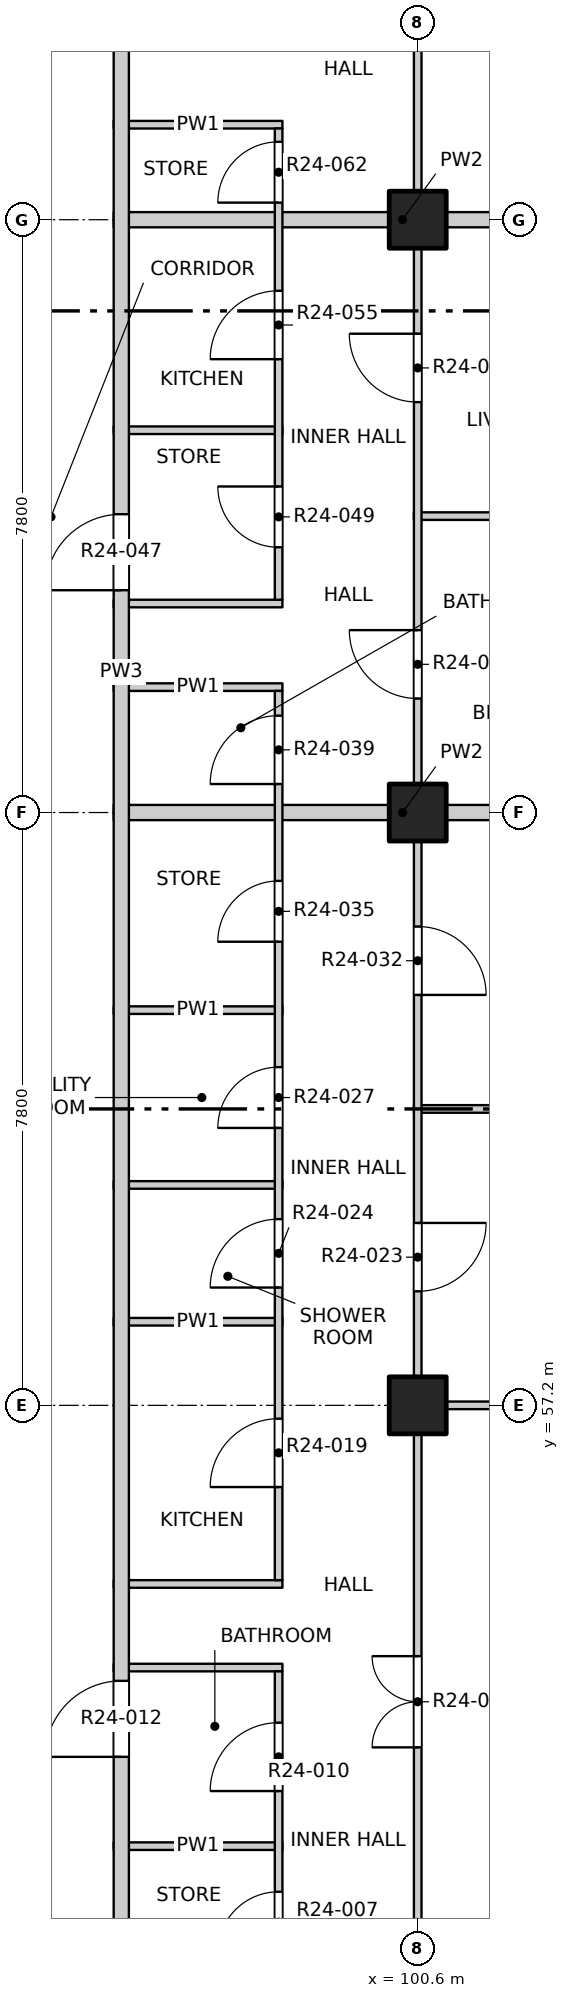
"""IFC4 building model, lengths in metres.
Left out: names, types, materials, properties, quantities, classifications, styles, units other than length and angle.
Written with IfcOpenShell. Run it as: python <this file> out.ifc"""

import sys

from ifc_helpers import new_model, si_unit, direction, frame, frame_2d, origin, origin_2d, place, context, subcontext, project, spatial, rectangle, extrude, element, fill, save


model = new_model("IFC4")
c1 = context("Model", 3, precision=1e-05, world=origin(), true_north=direction((0.0, 1.0)))
c2 = subcontext(c1, "Body", "Model", "MODEL_VIEW")
j1 = project(units=[si_unit("LENGTHUNIT", "METRE"), si_unit("PLANEANGLEUNIT", "RADIAN")], contexts=[c1])
p1 = place(None, origin())
s1 = spatial("IfcSite", under=j1, at=p1, CompositionType="ELEMENT")
p2 = place(p1, origin())
s2 = spatial("IfcBuilding", under=s1, at=p2, CompositionType="ELEMENT")
p3 = place(p2, frame((0.0, 0.0, 249.4)))
s3 = spatial("IfcBuildingStorey", under=s2, at=p3, CompositionType="ELEMENT", Elevation=249.4)
for number, where, z_axis, x_axis in (
    (1, (100.6, 57.2, -0.25), (0.0, 0.0, 1.0), (1.0, 0.0, 0.0)),
    (2, (100.6, 65.0, -0.25), (0.0, 0.0, 1.0), (1.0, 0.0, 0.0)),
    (3, (100.6, 72.8, -0.25), (0.0, 0.0, 1.0), (1.0, 0.0, 0.0)),
):
    element("IfcColumn", number, at=place(p3, frame(where, z_axis=z_axis, x_axis=x_axis)), inside=s3, PredefinedType="COLUMN", context=c2, shape_type="SweptSolid", body=[
        extrude(rectangle(XDim=0.75, YDim=0.75, at=origin_2d()), origin(), (0.0, 0.0, 1.0), 3.4),
    ])
for number, where, z_axis, x_axis in (
    (4, (96.6, 51.4, 0.0), (0.0, 0.0, 1.0), (1.0, 0.0, 0.0)),
    (5, (96.6, 53.75, 0.0), (0.0, 0.0, 1.0), (1.0, 0.0, 0.0)),
    (6, (96.6, 54.85, 0.0), (0.0, 0.0, 1.0), (1.0, 0.0, 0.0)),
):
    element("IfcWall", number, at=place(p3, frame(where, z_axis=z_axis, x_axis=x_axis)), inside=s3, PredefinedType="PARTITIONING", context=c2, shape_type="SweptSolid", body=[
        extrude(rectangle(XDim=2.22, YDim=0.1, at=frame_2d((1.11, 0.0))), origin(), (0.0, 0.0, 1.0), 3.15),
    ])
p4 = place(p3, frame((100.55, 57.2, 0.0), z_axis=(0.0, 0.0, 1.0), x_axis=(1.0, 0.0, 0.0)))
e7 = element("IfcWall", 7, at=p4, inside=s3, PredefinedType="PARTITIONING", context=c2, shape_type="SweptSolid", body=[
    extrude(rectangle(XDim=3.65, YDim=0.1, at=frame_2d((1.825, 0.0))), origin(), (0.0, 0.0, 1.0), 3.15),
])
for number, where, z_axis, x_axis in (
    (8, (96.6, 58.3, 0.0), (0.0, 0.0, 1.0), (1.0, 0.0, 0.0)),
    (9, (96.6, 60.1, 0.0), (0.0, 0.0, 1.0), (1.0, 0.0, 0.0)),
):
    element("IfcWall", number, at=place(p3, frame(where, z_axis=z_axis, x_axis=x_axis)), inside=s3, PredefinedType="PARTITIONING", context=c2, shape_type="SweptSolid", body=[
        extrude(rectangle(XDim=2.22, YDim=0.1, at=frame_2d((1.11, 0.0))), origin(), (0.0, 0.0, 1.0), 3.15),
    ])
p5 = place(p3, frame((100.55, 61.1, 0.0), z_axis=(0.0, 0.0, 1.0), x_axis=(1.0, 0.0, 0.0)))
e10 = element("IfcWall", 10, at=p5, inside=s3, PredefinedType="PARTITIONING", context=c2, shape_type="SweptSolid", body=[
    extrude(rectangle(XDim=3.65, YDim=0.1, at=frame_2d((1.825, 0.0))), origin(), (0.0, 0.0, 1.0), 2.55),
])
p6 = place(p3, frame((96.6, 62.4, 0.0), z_axis=(0.0, 0.0, 1.0), x_axis=(1.0, 0.0, 0.0)))
e11 = element("IfcWall", 11, at=p6, inside=s3, PredefinedType="PARTITIONING", context=c2, shape_type="SweptSolid", body=[
    extrude(rectangle(XDim=2.22, YDim=0.1, at=frame_2d((1.11, 0.0))), origin(), (0.0, 0.0, 1.0), 3.15),
])
p7 = place(p3, frame((96.6, 65.0, 0.0), z_axis=(0.0, 0.0, 1.0), x_axis=(1.0, 0.0, 0.0)))
e12 = element("IfcWall", 12, at=p7, inside=s3, PredefinedType="PARTITIONING", context=c2, shape_type="SweptSolid", body=[
    extrude(rectangle(XDim=7.6, YDim=0.2, at=frame_2d((3.8, 0.0))), origin(), (0.0, 0.0, 1.0), 3.15),
])
for number, where, z_axis, x_axis in (
    (13, (96.6, 66.65, 0.0), (0.0, 0.0, 1.0), (1.0, 0.0, 0.0)),
    (14, (96.6, 67.75, 0.0), (0.0, 0.0, 1.0), (1.0, 0.0, 0.0)),
):
    element("IfcWall", number, at=place(p3, frame(where, z_axis=z_axis, x_axis=x_axis)), inside=s3, PredefinedType="PARTITIONING", context=c2, shape_type="SweptSolid", body=[
        extrude(rectangle(XDim=2.22, YDim=0.1, at=frame_2d((1.11, 0.0))), origin(), (0.0, 0.0, 1.0), 3.15),
    ])
p8 = place(p3, frame((100.55, 68.9, 0.0), z_axis=(0.0, 0.0, 1.0), x_axis=(1.0, 0.0, 0.0)))
e15 = element("IfcWall", 15, at=p8, inside=s3, PredefinedType="PARTITIONING", context=c2, shape_type="SweptSolid", body=[
    extrude(rectangle(XDim=3.65, YDim=0.1, at=frame_2d((1.825, 0.0))), origin(), (0.0, 0.0, 1.0), 2.55),
])
p9 = place(p3, frame((96.6, 70.03, 0.0), z_axis=(0.0, 0.0, 1.0), x_axis=(1.0, 0.0, 0.0)))
e16 = element("IfcWall", 16, at=p9, inside=s3, PredefinedType="PARTITIONING", context=c2, shape_type="SweptSolid", body=[
    extrude(rectangle(XDim=2.22, YDim=0.1, at=frame_2d((1.11, 0.0))), origin(), (0.0, 0.0, 1.0), 3.15),
])
p10 = place(p3, frame((96.6, 72.8, 0.0), z_axis=(0.0, 0.0, 1.0), x_axis=(1.0, 0.0, 0.0)))
e17 = element("IfcWall", 17, at=p10, inside=s3, PredefinedType="PARTITIONING", context=c2, shape_type="SweptSolid", body=[
    extrude(rectangle(XDim=7.6, YDim=0.2, at=frame_2d((3.8, 0.0))), origin(), (0.0, 0.0, 1.0), 3.15),
])
p11 = place(p3, frame((96.6, 74.05, 0.0), z_axis=(0.0, 0.0, 1.0), x_axis=(1.0, 0.0, 0.0)))
e18 = element("IfcWall", 18, at=p11, inside=s3, PredefinedType="PARTITIONING", context=c2, shape_type="SweptSolid", body=[
    extrude(rectangle(XDim=2.22, YDim=0.1, at=frame_2d((1.11, 0.0))), origin(), (0.0, 0.0, 1.0), 3.15),
])
p12 = place(p3, frame((96.7, 49.5, 0.0), z_axis=(0.0, 0.0, 1.0), x_axis=(0.0, 1.0, 0.0)))
e19 = element("IfcWall", 19, at=p12, inside=s3, PredefinedType="PARTITIONING", context=c2, shape_type="SweptSolid", body=[
    extrude(rectangle(XDim=34.7, YDim=0.2, at=frame_2d((17.35, 0.0))), origin(), (0.0, 0.0, 1.0), 3.15),
])
p13 = place(p12, frame((3.075, 0.0, 0.0)))
e20 = element("IfcOpeningElement", 20, at=p13, cuts=e19, PredefinedType="OPENING", context=c2, shape_type="SweptSolid", body=[
    extrude(rectangle(XDim=1.0, YDim=2.1, at=frame_2d((0.5, 1.05))), frame((0.0, 0.11, 0.0), z_axis=(0.0, -1.0, 0.0), x_axis=(1.0, 0.0, 0.0)), (0.0, 0.0, 1.0), 0.22),
])
p14 = place(p12, frame((18.425, 0.0, 0.0)))
e21 = element("IfcOpeningElement", 21, at=p14, cuts=e19, PredefinedType="OPENING", context=c2, shape_type="SweptSolid", body=[
    extrude(rectangle(XDim=1.0, YDim=2.1, at=frame_2d((0.5, 1.05))), frame((0.0, 0.11, 0.0), z_axis=(0.0, -1.0, 0.0), x_axis=(1.0, 0.0, 0.0)), (0.0, 0.0, 1.0), 0.22),
])
p15 = place(p12, frame((25.825, 0.0, 0.0)))
e22 = element("IfcOpeningElement", 22, at=p15, cuts=e19, PredefinedType="OPENING", context=c2, shape_type="SweptSolid", body=[
    extrude(rectangle(XDim=1.0, YDim=2.1, at=frame_2d((0.5, 1.05))), frame((0.0, 0.11, 0.0), z_axis=(0.0, -1.0, 0.0), x_axis=(1.0, 0.0, 0.0)), (0.0, 0.0, 1.0), 0.22),
])
p16 = place(p3, frame((98.77, 49.45, 0.0), z_axis=(0.0, 0.0, 1.0), x_axis=(0.0, 1.0, 0.0)))
e23 = element("IfcWall", 23, at=p16, inside=s3, PredefinedType="PARTITIONING", context=c2, shape_type="SweptSolid", body=[
    extrude(rectangle(XDim=4.25, YDim=0.1, at=frame_2d((2.125, 0.0))), origin(), (0.0, 0.0, 1.0), 3.15),
])
p17 = place(p16, frame((0.55, 0.0, 0.0)))
e24 = element("IfcOpeningElement", 24, at=p17, cuts=e23, PredefinedType="OPENING", context=c2, shape_type="SweptSolid", body=[
    extrude(rectangle(XDim=0.8, YDim=2.1, at=frame_2d((0.4, 1.05))), frame((0.0, 0.06, 0.0), z_axis=(0.0, -1.0, 0.0), x_axis=(1.0, 0.0, 0.0)), (0.0, 0.0, 1.0), 0.12),
])
p18 = place(p16, frame((2.675, 0.0, 0.0)))
e25 = element("IfcOpeningElement", 25, at=p18, cuts=e23, PredefinedType="OPENING", context=c2, shape_type="SweptSolid", body=[
    extrude(rectangle(XDim=0.9, YDim=2.1, at=frame_2d((0.45, 1.05))), frame((0.0, 0.06, 0.0), z_axis=(0.0, -1.0, 0.0), x_axis=(1.0, 0.0, 0.0)), (0.0, 0.0, 1.0), 0.12),
])
p19 = place(p3, frame((98.77, 54.9, 0.0), z_axis=(0.0, 0.0, 1.0), x_axis=(0.0, 1.0, 0.0)))
e26 = element("IfcWall", 26, at=p19, inside=s3, PredefinedType="PARTITIONING", context=c2, shape_type="SweptSolid", body=[
    extrude(rectangle(XDim=11.7, YDim=0.1, at=frame_2d((5.85, 0.0))), origin(), (0.0, 0.0, 1.0), 3.15),
])
p20 = place(p19, frame((1.225, 0.0, 0.0)))
e27 = element("IfcOpeningElement", 27, at=p20, cuts=e26, PredefinedType="OPENING", context=c2, shape_type="SweptSolid", body=[
    extrude(rectangle(XDim=0.9, YDim=2.1, at=frame_2d((0.45, 1.05))), frame((0.0, 0.06, 0.0), z_axis=(0.0, -1.0, 0.0), x_axis=(1.0, 0.0, 0.0)), (0.0, 0.0, 1.0), 0.12),
])
p21 = place(p19, frame((3.85, 0.0, 0.0)))
e28 = element("IfcOpeningElement", 28, at=p21, cuts=e26, PredefinedType="OPENING", context=c2, shape_type="SweptSolid", body=[
    extrude(rectangle(XDim=0.9, YDim=2.1, at=frame_2d((0.45, 1.05))), frame((0.0, 0.06, 0.0), z_axis=(0.0, -1.0, 0.0), x_axis=(1.0, 0.0, 0.0)), (0.0, 0.0, 1.0), 0.12),
])
p22 = place(p19, frame((5.95, 0.0, 0.0)))
e29 = element("IfcOpeningElement", 29, at=p22, cuts=e26, PredefinedType="OPENING", context=c2, shape_type="SweptSolid", body=[
    extrude(rectangle(XDim=0.8, YDim=2.1, at=frame_2d((0.4, 1.05))), frame((0.0, 0.06, 0.0), z_axis=(0.0, -1.0, 0.0), x_axis=(1.0, 0.0, 0.0)), (0.0, 0.0, 1.0), 0.12),
])
p23 = place(p19, frame((8.4, 0.0, 0.0)))
e30 = element("IfcOpeningElement", 30, at=p23, cuts=e26, PredefinedType="OPENING", context=c2, shape_type="SweptSolid", body=[
    extrude(rectangle(XDim=0.8, YDim=2.1, at=frame_2d((0.4, 1.05))), frame((0.0, 0.06, 0.0), z_axis=(0.0, -1.0, 0.0), x_axis=(1.0, 0.0, 0.0)), (0.0, 0.0, 1.0), 0.12),
])
p24 = place(p19, frame((10.475, 0.0, 0.0)))
e31 = element("IfcOpeningElement", 31, at=p24, cuts=e26, PredefinedType="OPENING", context=c2, shape_type="SweptSolid", body=[
    extrude(rectangle(XDim=0.9, YDim=2.1, at=frame_2d((0.45, 1.05))), frame((0.0, 0.06, 0.0), z_axis=(0.0, -1.0, 0.0), x_axis=(1.0, 0.0, 0.0)), (0.0, 0.0, 1.0), 0.12),
])
p25 = place(p3, frame((98.77, 67.8, 0.0), z_axis=(0.0, 0.0, 1.0), x_axis=(0.0, 1.0, 0.0)))
e32 = element("IfcWall", 32, at=p25, inside=s3, PredefinedType="PARTITIONING", context=c2, shape_type="SweptSolid", body=[
    extrude(rectangle(XDim=6.2, YDim=0.1, at=frame_2d((3.1, 0.0))), origin(), (0.0, 0.0, 1.0), 3.15),
])
p26 = place(p25, frame((0.69, 0.0, 0.0)))
e33 = element("IfcOpeningElement", 33, at=p26, cuts=e32, PredefinedType="OPENING", context=c2, shape_type="SweptSolid", body=[
    extrude(rectangle(XDim=0.8, YDim=2.1, at=frame_2d((0.4, 1.05))), frame((0.0, 0.06, 0.0), z_axis=(0.0, -1.0, 0.0), x_axis=(1.0, 0.0, 0.0)), (0.0, 0.0, 1.0), 0.12),
])
p27 = place(p25, frame((3.165, 0.0, 0.0)))
e34 = element("IfcOpeningElement", 34, at=p27, cuts=e32, PredefinedType="OPENING", context=c2, shape_type="SweptSolid", body=[
    extrude(rectangle(XDim=0.9, YDim=2.1, at=frame_2d((0.45, 1.05))), frame((0.0, 0.06, 0.0), z_axis=(0.0, -1.0, 0.0), x_axis=(1.0, 0.0, 0.0)), (0.0, 0.0, 1.0), 0.12),
])
p28 = place(p25, frame((5.225, 0.0, 0.0)))
e35 = element("IfcOpeningElement", 35, at=p28, cuts=e32, PredefinedType="OPENING", context=c2, shape_type="SweptSolid", body=[
    extrude(rectangle(XDim=0.8, YDim=2.1, at=frame_2d((0.4, 1.05))), frame((0.0, 0.06, 0.0), z_axis=(0.0, -1.0, 0.0), x_axis=(1.0, 0.0, 0.0)), (0.0, 0.0, 1.0), 0.12),
])
p29 = place(p3, frame((100.6, 45.8, 0.0), z_axis=(0.0, 0.0, 1.0), x_axis=(0.0, 1.0, 0.0)))
e36 = element("IfcWall", 36, at=p29, inside=s3, PredefinedType="PARTITIONING", context=c2, shape_type="SweptSolid", body=[
    extrude(rectangle(XDim=38.4, YDim=0.1, at=frame_2d((19.2, 0.0))), origin(), (0.0, 0.0, 1.0), 3.15),
])
p30 = place(p29, frame((1.05, 0.0, 0.0)))
e37 = element("IfcOpeningElement", 37, at=p30, cuts=e36, PredefinedType="OPENING", context=c2, shape_type="SweptSolid", body=[
    extrude(rectangle(XDim=1.2, YDim=2.1, at=frame_2d((0.6, 1.05))), frame((0.0, 0.06, 0.0), z_axis=(0.0, -1.0, 0.0), x_axis=(1.0, 0.0, 0.0)), (0.0, 0.0, 1.0), 0.12),
])
p31 = place(p29, frame((6.9, 0.0, 0.0)))
e38 = element("IfcOpeningElement", 38, at=p31, cuts=e36, PredefinedType="OPENING", context=c2, shape_type="SweptSolid", body=[
    extrude(rectangle(XDim=1.2, YDim=2.1, at=frame_2d((0.6, 1.05))), frame((0.0, 0.06, 0.0), z_axis=(0.0, -1.0, 0.0), x_axis=(1.0, 0.0, 0.0)), (0.0, 0.0, 1.0), 0.12),
])
p32 = place(p29, frame((12.9, 0.0, 0.0)))
e39 = element("IfcOpeningElement", 39, at=p32, cuts=e36, PredefinedType="OPENING", context=c2, shape_type="SweptSolid", body=[
    extrude(rectangle(XDim=0.9, YDim=2.1, at=frame_2d((0.45, 1.05))), frame((0.0, 0.06, 0.0), z_axis=(0.0, -1.0, 0.0), x_axis=(1.0, 0.0, 0.0)), (0.0, 0.0, 1.0), 0.12),
])
p33 = place(p29, frame((16.8, 0.0, 0.0)))
e40 = element("IfcOpeningElement", 40, at=p33, cuts=e36, PredefinedType="OPENING", context=c2, shape_type="SweptSolid", body=[
    extrude(rectangle(XDim=0.9, YDim=2.1, at=frame_2d((0.45, 1.05))), frame((0.0, 0.06, 0.0), z_axis=(0.0, -1.0, 0.0), x_axis=(1.0, 0.0, 0.0)), (0.0, 0.0, 1.0), 0.12),
])
p34 = place(p29, frame((20.7, 0.0, 0.0)))
e41 = element("IfcOpeningElement", 41, at=p34, cuts=e36, PredefinedType="OPENING", context=c2, shape_type="SweptSolid", body=[
    extrude(rectangle(XDim=0.9, YDim=2.1, at=frame_2d((0.45, 1.05))), frame((0.0, 0.06, 0.0), z_axis=(0.0, -1.0, 0.0), x_axis=(1.0, 0.0, 0.0)), (0.0, 0.0, 1.0), 0.12),
])
p35 = place(p29, frame((24.6, 0.0, 0.0)))
e42 = element("IfcOpeningElement", 42, at=p35, cuts=e36, PredefinedType="OPENING", context=c2, shape_type="SweptSolid", body=[
    extrude(rectangle(XDim=0.9, YDim=2.1, at=frame_2d((0.45, 1.05))), frame((0.0, 0.06, 0.0), z_axis=(0.0, -1.0, 0.0), x_axis=(1.0, 0.0, 0.0)), (0.0, 0.0, 1.0), 0.12),
])
p36 = place(p29, frame((30.3, 0.0, 0.0)))
e43 = element("IfcOpeningElement", 43, at=p36, cuts=e36, PredefinedType="OPENING", context=c2, shape_type="SweptSolid", body=[
    extrude(rectangle(XDim=1.2, YDim=2.1, at=frame_2d((0.6, 1.05))), frame((0.0, 0.06, 0.0), z_axis=(0.0, -1.0, 0.0), x_axis=(1.0, 0.0, 0.0)), (0.0, 0.0, 1.0), 0.12),
])
p37 = place(p29, frame((36.15, 0.0, 0.0)))
e44 = element("IfcOpeningElement", 44, at=p37, cuts=e36, PredefinedType="OPENING", context=c2, shape_type="SweptSolid", body=[
    extrude(rectangle(XDim=1.2, YDim=2.1, at=frame_2d((0.6, 1.05))), frame((0.0, 0.06, 0.0), z_axis=(0.0, -1.0, 0.0), x_axis=(1.0, 0.0, 0.0)), (0.0, 0.0, 1.0), 0.12),
])
p38 = place(p17, origin())
e45 = element("IfcDoor", 45, at=p38, inside=s3, OperationType="SINGLE_SWING_LEFT", PredefinedType="DOOR", context=c2, shape_type="SweptSolid", body=[
    extrude(rectangle(XDim=0.8, YDim=2.1, at=frame_2d((0.4, 1.05))), frame((0.0, 0.025, 0.0), z_axis=(0.0, -1.0, 0.0), x_axis=(1.0, 0.0, 0.0)), (0.0, 0.0, 1.0), 0.05),
])
fill(e24, e45)
p39 = place(p18, origin())
e46 = element("IfcDoor", 46, at=p39, inside=s3, OperationType="SINGLE_SWING_LEFT", PredefinedType="DOOR", context=c2, shape_type="SweptSolid", body=[
    extrude(rectangle(XDim=0.9, YDim=2.1, at=frame_2d((0.45, 1.05))), frame((0.0, 0.025, 0.0), z_axis=(0.0, -1.0, 0.0), x_axis=(1.0, 0.0, 0.0)), (0.0, 0.0, 1.0), 0.05),
])
fill(e25, e46)
p40 = place(p13, origin())
e47 = element("IfcDoor", 47, at=p40, inside=s3, OperationType="SINGLE_SWING_RIGHT", PredefinedType="DOOR", context=c2, shape_type="SweptSolid", body=[
    extrude(rectangle(XDim=1.0, YDim=2.1, at=frame_2d((0.5, 1.05))), frame((0.0, 0.025, 0.0), z_axis=(0.0, -1.0, 0.0), x_axis=(1.0, 0.0, 0.0)), (0.0, 0.0, 1.0), 0.05),
])
fill(e20, e47)
p41 = place(p31, origin())
e48 = element("IfcDoor", 48, at=p41, inside=s3, OperationType="DOUBLE_DOOR_SINGLE_SWING", PredefinedType="DOOR", context=c2, shape_type="SweptSolid", body=[
    extrude(rectangle(XDim=1.2, YDim=2.1, at=frame_2d((0.6, 1.05))), frame((0.0, 0.025, 0.0), z_axis=(0.0, -1.0, 0.0), x_axis=(1.0, 0.0, 0.0)), (0.0, 0.0, 1.0), 0.05),
])
fill(e38, e48)
p42 = place(p20, origin())
e49 = element("IfcDoor", 49, at=p42, inside=s3, OperationType="SINGLE_SWING_LEFT", PredefinedType="DOOR", context=c2, shape_type="SweptSolid", body=[
    extrude(rectangle(XDim=0.9, YDim=2.1, at=frame_2d((0.45, 1.05))), frame((0.0, 0.025, 0.0), z_axis=(0.0, -1.0, 0.0), x_axis=(1.0, 0.0, 0.0)), (0.0, 0.0, 1.0), 0.05),
])
fill(e27, e49)
p43 = place(p32, origin())
e50 = element("IfcDoor", 50, at=p43, inside=s3, OperationType="SINGLE_SWING_LEFT", PredefinedType="DOOR", context=c2, shape_type="SweptSolid", body=[
    extrude(rectangle(XDim=0.9, YDim=2.1, at=frame_2d((0.45, 1.05))), frame((0.0, 0.025, 0.0), z_axis=(0.0, -1.0, 0.0), x_axis=(1.0, 0.0, 0.0)), (0.0, 0.0, 1.0), 0.05),
])
fill(e39, e50)
p44 = place(p21, origin())
e51 = element("IfcDoor", 51, at=p44, inside=s3, OperationType="SINGLE_SWING_LEFT", PredefinedType="DOOR", context=c2, shape_type="SweptSolid", body=[
    extrude(rectangle(XDim=0.9, YDim=2.1, at=frame_2d((0.45, 1.05))), frame((0.0, 0.025, 0.0), z_axis=(0.0, -1.0, 0.0), x_axis=(1.0, 0.0, 0.0)), (0.0, 0.0, 1.0), 0.05),
])
fill(e28, e51)
p45 = place(p22, origin())
e52 = element("IfcDoor", 52, at=p45, inside=s3, OperationType="SINGLE_SWING_LEFT", PredefinedType="DOOR", context=c2, shape_type="SweptSolid", body=[
    extrude(rectangle(XDim=0.8, YDim=2.1, at=frame_2d((0.4, 1.05))), frame((0.0, 0.025, 0.0), z_axis=(0.0, -1.0, 0.0), x_axis=(1.0, 0.0, 0.0)), (0.0, 0.0, 1.0), 0.05),
])
fill(e29, e52)
p46 = place(p33, origin())
e53 = element("IfcDoor", 53, at=p46, inside=s3, OperationType="SINGLE_SWING_RIGHT", PredefinedType="DOOR", context=c2, shape_type="SweptSolid", body=[
    extrude(rectangle(XDim=0.9, YDim=2.1, at=frame_2d((0.45, 1.05))), frame((0.0, 0.025, 0.0), z_axis=(0.0, -1.0, 0.0), x_axis=(1.0, 0.0, 0.0)), (0.0, 0.0, 1.0), 0.05),
])
fill(e40, e53)
p47 = place(p23, origin())
e54 = element("IfcDoor", 54, at=p47, inside=s3, OperationType="SINGLE_SWING_LEFT", PredefinedType="DOOR", context=c2, shape_type="SweptSolid", body=[
    extrude(rectangle(XDim=0.8, YDim=2.1, at=frame_2d((0.4, 1.05))), frame((0.0, 0.025, 0.0), z_axis=(0.0, -1.0, 0.0), x_axis=(1.0, 0.0, 0.0)), (0.0, 0.0, 1.0), 0.05),
])
fill(e30, e54)
p48 = place(p24, origin())
e55 = element("IfcDoor", 55, at=p48, inside=s3, OperationType="SINGLE_SWING_LEFT", PredefinedType="DOOR", context=c2, shape_type="SweptSolid", body=[
    extrude(rectangle(XDim=0.9, YDim=2.1, at=frame_2d((0.45, 1.05))), frame((0.0, 0.025, 0.0), z_axis=(0.0, -1.0, 0.0), x_axis=(1.0, 0.0, 0.0)), (0.0, 0.0, 1.0), 0.05),
])
fill(e31, e55)
p49 = place(p34, origin())
e56 = element("IfcDoor", 56, at=p49, inside=s3, OperationType="SINGLE_SWING_RIGHT", PredefinedType="DOOR", context=c2, shape_type="SweptSolid", body=[
    extrude(rectangle(XDim=0.9, YDim=2.1, at=frame_2d((0.45, 1.05))), frame((0.0, 0.025, 0.0), z_axis=(0.0, -1.0, 0.0), x_axis=(1.0, 0.0, 0.0)), (0.0, 0.0, 1.0), 0.05),
])
fill(e41, e56)
p50 = place(p14, origin())
e57 = element("IfcDoor", 57, at=p50, inside=s3, OperationType="SINGLE_SWING_LEFT", PredefinedType="DOOR", context=c2, shape_type="SweptSolid", body=[
    extrude(rectangle(XDim=1.0, YDim=2.1, at=frame_2d((0.5, 1.05))), frame((0.0, 0.025, 0.0), z_axis=(0.0, -1.0, 0.0), x_axis=(1.0, 0.0, 0.0)), (0.0, 0.0, 1.0), 0.05),
])
fill(e21, e57)
p51 = place(p26, origin())
e58 = element("IfcDoor", 58, at=p51, inside=s3, OperationType="SINGLE_SWING_RIGHT", PredefinedType="DOOR", context=c2, shape_type="SweptSolid", body=[
    extrude(rectangle(XDim=0.8, YDim=2.1, at=frame_2d((0.4, 1.05))), frame((0.0, 0.025, 0.0), z_axis=(0.0, -1.0, 0.0), x_axis=(1.0, 0.0, 0.0)), (0.0, 0.0, 1.0), 0.05),
])
fill(e33, e58)
p52 = place(p35, origin())
e59 = element("IfcDoor", 59, at=p52, inside=s3, OperationType="SINGLE_SWING_RIGHT", PredefinedType="DOOR", context=c2, shape_type="SweptSolid", body=[
    extrude(rectangle(XDim=0.9, YDim=2.1, at=frame_2d((0.45, 1.05))), frame((0.0, 0.025, 0.0), z_axis=(0.0, -1.0, 0.0), x_axis=(1.0, 0.0, 0.0)), (0.0, 0.0, 1.0), 0.05),
])
fill(e42, e59)
p53 = place(p27, origin())
e60 = element("IfcDoor", 60, at=p53, inside=s3, OperationType="SINGLE_SWING_LEFT", PredefinedType="DOOR", context=c2, shape_type="SweptSolid", body=[
    extrude(rectangle(XDim=0.9, YDim=2.1, at=frame_2d((0.45, 1.05))), frame((0.0, 0.025, 0.0), z_axis=(0.0, -1.0, 0.0), x_axis=(1.0, 0.0, 0.0)), (0.0, 0.0, 1.0), 0.05),
])
fill(e34, e60)
p54 = place(p28, origin())
e61 = element("IfcDoor", 61, at=p54, inside=s3, OperationType="SINGLE_SWING_LEFT", PredefinedType="DOOR", context=c2, shape_type="SweptSolid", body=[
    extrude(rectangle(XDim=0.8, YDim=2.1, at=frame_2d((0.4, 1.05))), frame((0.0, 0.025, 0.0), z_axis=(0.0, -1.0, 0.0), x_axis=(1.0, 0.0, 0.0)), (0.0, 0.0, 1.0), 0.05),
])
fill(e35, e61)
save(model, sys.argv[1])
